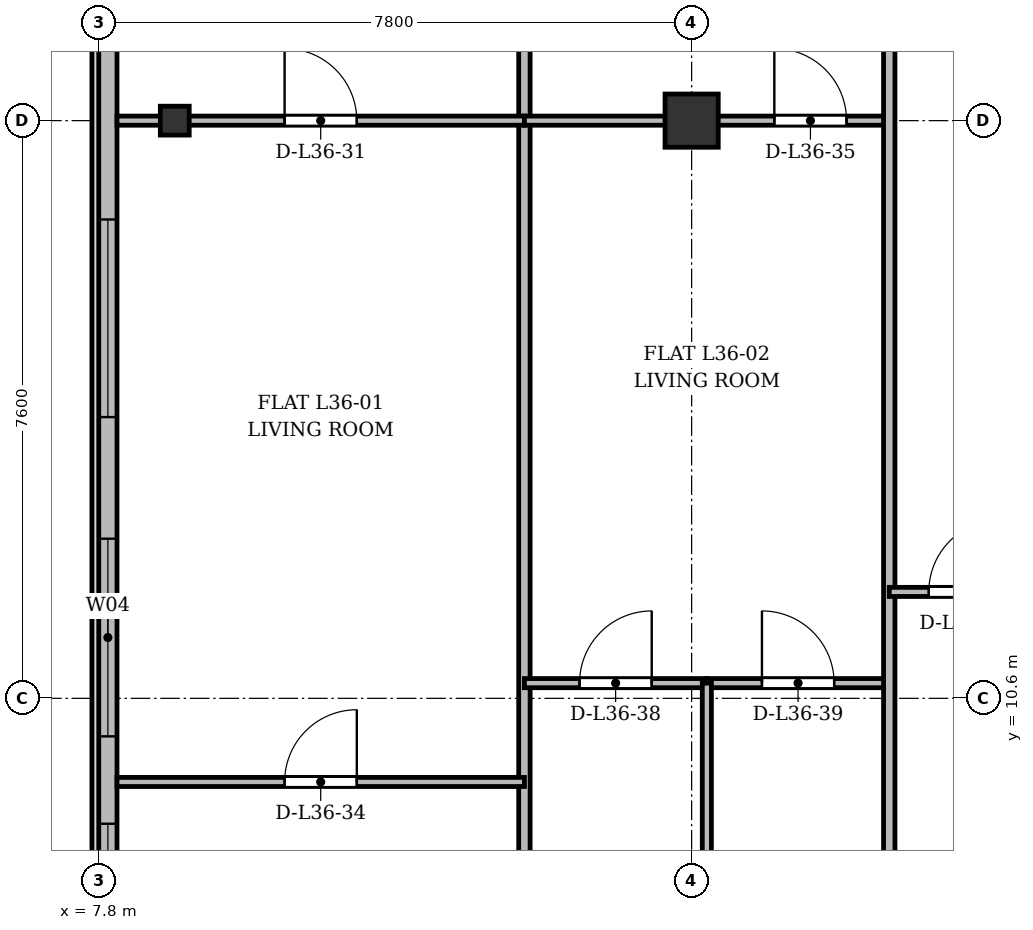
"""IFC4 building model, lengths in metres.
Left out: names, types, materials, properties, quantities, classifications, styles, units other than length and angle.
Written with IfcOpenShell. Run it as: python <this file> out.ifc"""

import sys

from ifc_helpers import new_model, si_unit, direction, frame, frame_2d, origin, origin_2d, place, context, subcontext, project, spatial, rectangle, i_section, extrude, source, transform, mapped, element, fill, save


model = new_model("IFC4")
c1 = context("Model", 3, precision=1e-05, world=origin(), true_north=direction((0.0, 1.0)))
c2 = subcontext(c1, "Body", "Model", "MODEL_VIEW")
j1 = project(units=[si_unit("LENGTHUNIT", "METRE"), si_unit("PLANEANGLEUNIT", "RADIAN")], contexts=[c1])
p1 = place(None, origin())
s1 = spatial("IfcSite", under=j1, at=p1, CompositionType="ELEMENT")
p2 = place(p1, origin())
s2 = spatial("IfcBuilding", under=s1, at=p2, CompositionType="ELEMENT")
p3 = place(p2, frame((0.0, 0.0, 139.3)))
s3 = spatial("IfcBuildingStorey", under=s2, at=p3, CompositionType="ELEMENT", Elevation=139.3)
m1 = source(origin(), c2, "Body", "SweptSolid", [
    extrude(i_section(OverallWidth=0.38, OverallDepth=0.38, WebThickness=0.02, FlangeThickness=0.03, at=origin_2d()), origin(), (0.0, 0.0, 1.0), 3.6),
])
p4 = place(p3, frame((8.8, 18.2, 0.0), z_axis=(0.0, 0.0, 1.0), x_axis=(1.0, 0.0, 0.0)))
e1 = element("IfcColumn", 1, at=p4, inside=s3, PredefinedType="COLUMN", context=c2, shape_type="MappedRepresentation", body=[
    mapped(m1, transform((0.0, 0.0, 0.0), x_axis=(1.0, 0.0, 0.0), y_axis=(0.0, 1.0, 0.0), z_axis=(0.0, 0.0, 1.0), scale=1.0)),
])
m2 = source(origin(), c2, "Body", "SweptSolid", [
    extrude(rectangle(XDim=0.7, YDim=0.7, at=origin_2d()), origin(), (0.0, 0.0, 1.0), 3.6),
])
p5 = place(p3, frame((15.6, 18.2, 0.0), z_axis=(0.0, 0.0, 1.0), x_axis=(1.0, 0.0, 0.0)))
e2 = element("IfcColumn", 2, at=p5, inside=s3, PredefinedType="COLUMN", context=c2, shape_type="MappedRepresentation", body=[
    mapped(m2, transform((0.0, 0.0, 0.0), x_axis=(1.0, 0.0, 0.0), y_axis=(0.0, 1.0, 0.0), z_axis=(0.0, 0.0, 1.0), scale=1.0)),
])
p6 = place(p3, frame((7.92, 6.3, 0.0), z_axis=(0.0, 0.0, 1.0), x_axis=(0.0, 1.0, 0.0)))
e3 = element("IfcWall", 3, at=p6, inside=s3, PredefinedType="SOLIDWALL", context=c2, shape_type="SweptSolid", body=[
    extrude(rectangle(XDim=39.2, YDim=0.24, at=frame_2d((19.6, 0.0))), origin(), (0.0, 0.0, 1.0), 3.35),
])
p7 = place(p6, frame((1.45, 0.0, 0.92)))
e4 = element("IfcOpeningElement", 4, at=p7, cuts=e3, PredefinedType="OPENING", context=c2, shape_type="SweptSolid", body=[
    extrude(rectangle(XDim=1.2, YDim=1.65, at=frame_2d((0.6, 0.825))), frame((0.0, 0.13, 0.0), z_axis=(0.0, -1.0, 0.0), x_axis=(1.0, 0.0, 0.0)), (0.0, 0.0, 1.0), 0.26),
])
p8 = place(p6, frame((3.8, 0.0, 0.92)))
e5 = element("IfcOpeningElement", 5, at=p8, cuts=e3, PredefinedType="OPENING", context=c2, shape_type="SweptSolid", body=[
    extrude(rectangle(XDim=2.6, YDim=1.9, at=frame_2d((1.3, 0.95))), frame((0.0, 0.13, 0.0), z_axis=(0.0, -1.0, 0.0), x_axis=(1.0, 0.0, 0.0)), (0.0, 0.0, 1.0), 0.26),
])
p9 = place(p6, frame((8.0, 0.0, 0.92)))
e6 = element("IfcOpeningElement", 6, at=p9, cuts=e3, PredefinedType="OPENING", context=c2, shape_type="SweptSolid", body=[
    extrude(rectangle(XDim=2.6, YDim=1.9, at=frame_2d((1.3, 0.95))), frame((0.0, 0.13, 0.0), z_axis=(0.0, -1.0, 0.0), x_axis=(1.0, 0.0, 0.0)), (0.0, 0.0, 1.0), 0.26),
])
p10 = place(p6, frame((15.2, 0.0, 0.92)))
e7 = element("IfcOpeningElement", 7, at=p10, cuts=e3, PredefinedType="OPENING", context=c2, shape_type="SweptSolid", body=[
    extrude(rectangle(XDim=2.6, YDim=1.9, at=frame_2d((1.3, 0.95))), frame((0.0, 0.13, 0.0), z_axis=(0.0, -1.0, 0.0), x_axis=(1.0, 0.0, 0.0)), (0.0, 0.0, 1.0), 0.26),
])
p11 = place(p6, frame((33.5, 0.0, 0.92)))
e8 = element("IfcOpeningElement", 8, at=p11, cuts=e3, PredefinedType="OPENING", context=c2, shape_type="SweptSolid", body=[
    extrude(rectangle(XDim=1.2, YDim=1.65, at=frame_2d((0.6, 0.825))), frame((0.0, 0.13, 0.0), z_axis=(0.0, -1.0, 0.0), x_axis=(1.0, 0.0, 0.0)), (0.0, 0.0, 1.0), 0.26),
])
p12 = place(p6, frame((36.85, 0.0, 0.92)))
e9 = element("IfcOpeningElement", 9, at=p12, cuts=e3, PredefinedType="OPENING", context=c2, shape_type="SweptSolid", body=[
    extrude(rectangle(XDim=1.2, YDim=1.65, at=frame_2d((0.6, 0.825))), frame((0.0, 0.13, 0.0), z_axis=(0.0, -1.0, 0.0), x_axis=(1.0, 0.0, 0.0)), (0.0, 0.0, 1.0), 0.26),
])
p13 = place(p3, frame((13.4, 3.525, 0.0), z_axis=(0.0, 0.0, 1.0), x_axis=(0.0, 1.0, 0.0)))
e10 = element("IfcWall", 10, at=p13, inside=s3, PredefinedType="PARTITIONING", context=c2, shape_type="SweptSolid", body=[
    extrude(rectangle(XDim=27.275, YDim=0.15, at=frame_2d((13.638, 0.0))), origin(), (0.0, 0.0, 1.0), 2.75),
])
p14 = place(p3, frame((8.04, 18.2, 0.0), z_axis=(0.0, 0.0, 1.0), x_axis=(1.0, 0.0, 0.0)))
e11 = element("IfcWall", 11, at=p14, inside=s3, PredefinedType="PARTITIONING", context=c2, shape_type="SweptSolid", body=[
    extrude(rectangle(XDim=5.36, YDim=0.12, at=frame_2d((2.68, 0.0))), origin(), (0.0, 0.0, 1.0), 2.75),
])
p15 = place(p14, frame((2.205, 0.0, 0.0)))
e12 = element("IfcOpeningElement", 12, at=p15, cuts=e11, PredefinedType="OPENING", context=c2, shape_type="SweptSolid", body=[
    extrude(rectangle(XDim=0.95, YDim=2.15, at=frame_2d((0.475, 1.075))), frame((0.0, 0.07, 0.0), z_axis=(0.0, -1.0, 0.0), x_axis=(1.0, 0.0, 0.0)), (0.0, 0.0, 1.0), 0.14),
])
p16 = place(p3, frame((8.04, 9.5, 0.0), z_axis=(0.0, 0.0, 1.0), x_axis=(1.0, 0.0, 0.0)))
e13 = element("IfcWall", 13, at=p16, inside=s3, PredefinedType="PARTITIONING", context=c2, shape_type="SweptSolid", body=[
    extrude(rectangle(XDim=5.36, YDim=0.12, at=frame_2d((2.68, 0.0))), origin(), (0.0, 0.0, 1.0), 2.85),
])
p17 = place(p16, frame((2.205, 0.0, 0.0)))
e14 = element("IfcOpeningElement", 14, at=p17, cuts=e13, PredefinedType="OPENING", context=c2, shape_type="SweptSolid", body=[
    extrude(rectangle(XDim=0.95, YDim=2.15, at=frame_2d((0.475, 1.075))), frame((0.0, 0.07, 0.0), z_axis=(0.0, -1.0, 0.0), x_axis=(1.0, 0.0, 0.0)), (0.0, 0.0, 1.0), 0.14),
])
p18 = place(p3, frame((13.4, 18.2, 0.0), z_axis=(0.0, 0.0, 1.0), x_axis=(1.0, 0.0, 0.0)))
e15 = element("IfcWall", 15, at=p18, inside=s3, PredefinedType="PARTITIONING", context=c2, shape_type="SweptSolid", body=[
    extrude(rectangle(XDim=4.8, YDim=0.12, at=frame_2d((2.4, 0.0))), origin(), (0.0, 0.0, 1.0), 2.75),
])
p19 = place(p18, frame((3.288, 0.0, 0.0)))
e16 = element("IfcOpeningElement", 16, at=p19, cuts=e15, PredefinedType="OPENING", context=c2, shape_type="SweptSolid", body=[
    extrude(rectangle(XDim=0.95, YDim=2.15, at=frame_2d((0.475, 1.075))), frame((0.0, 0.07, 0.0), z_axis=(0.0, -1.0, 0.0), x_axis=(1.0, 0.0, 0.0)), (0.0, 0.0, 1.0), 0.14),
])
p20 = place(p3, frame((13.4, 10.8, 0.0), z_axis=(0.0, 0.0, 1.0), x_axis=(1.0, 0.0, 0.0)))
e17 = element("IfcWall", 17, at=p20, inside=s3, PredefinedType="PARTITIONING", context=c2, shape_type="SweptSolid", body=[
    extrude(rectangle(XDim=2.4, YDim=0.12, at=frame_2d((1.2, 0.0))), origin(), (0.0, 0.0, 1.0), 2.85),
])
p21 = place(p20, frame((0.725, 0.0, 0.0)))
e18 = element("IfcOpeningElement", 18, at=p21, cuts=e17, PredefinedType="OPENING", context=c2, shape_type="SweptSolid", body=[
    extrude(rectangle(XDim=0.95, YDim=2.15, at=frame_2d((0.475, 1.075))), frame((0.0, 0.07, 0.0), z_axis=(0.0, -1.0, 0.0), x_axis=(1.0, 0.0, 0.0)), (0.0, 0.0, 1.0), 0.14),
])
p22 = place(p3, frame((15.8, 10.8, 0.0), z_axis=(0.0, 0.0, 1.0), x_axis=(1.0, 0.0, 0.0)))
e19 = element("IfcWall", 19, at=p22, inside=s3, PredefinedType="PARTITIONING", context=c2, shape_type="SweptSolid", body=[
    extrude(rectangle(XDim=2.4, YDim=0.12, at=frame_2d((1.2, 0.0))), origin(), (0.0, 0.0, 1.0), 3.0),
])
p23 = place(p22, frame((0.725, 0.0, 0.0)))
e20 = element("IfcOpeningElement", 20, at=p23, cuts=e19, PredefinedType="OPENING", context=c2, shape_type="SweptSolid", body=[
    extrude(rectangle(XDim=0.95, YDim=2.15, at=frame_2d((0.475, 1.075))), frame((0.0, 0.07, 0.0), z_axis=(0.0, -1.0, 0.0), x_axis=(1.0, 0.0, 0.0)), (0.0, 0.0, 1.0), 0.14),
])
p24 = place(p3, frame((15.8, 3.525, 0.0), z_axis=(0.0, 0.0, 1.0), x_axis=(0.0, 1.0, 0.0)))
e21 = element("IfcWall", 21, at=p24, inside=s3, PredefinedType="PARTITIONING", context=c2, shape_type="SweptSolid", body=[
    extrude(rectangle(XDim=7.275, YDim=0.12, at=frame_2d((3.638, 0.0))), origin(), (0.0, 0.0, 1.0), 2.75),
])
p25 = place(p3, frame((18.2, 3.525, 0.0), z_axis=(0.0, 0.0, 1.0), x_axis=(0.0, 1.0, 0.0)))
e22 = element("IfcWall", 22, at=p25, inside=s3, PredefinedType="PARTITIONING", context=c2, shape_type="SweptSolid", body=[
    extrude(rectangle(XDim=27.275, YDim=0.15, at=frame_2d((13.638, 0.0))), origin(), (0.0, 0.0, 1.0), 2.75),
])
p26 = place(p3, frame((18.2, 12.0, 0.0), z_axis=(0.0, 0.0, 1.0), x_axis=(1.0, 0.0, 0.0)))
e23 = element("IfcWall", 23, at=p26, inside=s3, PredefinedType="PARTITIONING", context=c2, shape_type="SweptSolid", body=[
    extrude(rectangle(XDim=2.0, YDim=0.12, at=frame_2d((1.0, 0.0))), origin(), (0.0, 0.0, 1.0), 3.35),
])
p27 = place(p26, frame((0.52, 0.0, 0.0)))
e24 = element("IfcOpeningElement", 24, at=p27, cuts=e23, PredefinedType="OPENING", context=c2, shape_type="SweptSolid", body=[
    extrude(rectangle(XDim=0.95, YDim=2.15, at=frame_2d((0.475, 1.075))), frame((0.0, 0.07, 0.0), z_axis=(0.0, -1.0, 0.0), x_axis=(1.0, 0.0, 0.0)), (0.0, 0.0, 1.0), 0.14),
])
m3 = source(origin(), c2, "Body", "SweptSolid", [
    extrude(rectangle(XDim=1.2, YDim=1.65, at=frame_2d((0.6, 0.825))), frame((0.0, 0.03, 0.0), z_axis=(0.0, -1.0, 0.0), x_axis=(1.0, 0.0, 0.0)), (0.0, 0.0, 1.0), 0.06),
])
p28 = place(p7, origin())
e25 = element("IfcWindow", 25, at=p28, inside=s3, PartitioningType="SINGLE_PANEL", PredefinedType="WINDOW", context=c2, shape_type="MappedRepresentation", body=[
    mapped(m3, transform((0.0, 0.0, 0.0), x_axis=(1.0, 0.0, 0.0), y_axis=(0.0, 1.0, 0.0), z_axis=(0.0, 0.0, 1.0), scale=1.0)),
])
fill(e4, e25)
m4 = source(origin(), c2, "Body", "SweptSolid", [
    extrude(rectangle(XDim=2.6, YDim=1.9, at=frame_2d((1.3, 0.95))), frame((0.0, 0.03, 0.0), z_axis=(0.0, -1.0, 0.0), x_axis=(1.0, 0.0, 0.0)), (0.0, 0.0, 1.0), 0.06),
])
p29 = place(p8, origin())
e26 = element("IfcWindow", 26, at=p29, inside=s3, PartitioningType="SINGLE_PANEL", PredefinedType="WINDOW", context=c2, shape_type="MappedRepresentation", body=[
    mapped(m4, transform((0.0, 0.0, 0.0), x_axis=(1.0, 0.0, 0.0), y_axis=(0.0, 1.0, 0.0), z_axis=(0.0, 0.0, 1.0), scale=1.0)),
])
fill(e5, e26)
p30 = place(p9, origin())
e27 = element("IfcWindow", 27, at=p30, inside=s3, PartitioningType="SINGLE_PANEL", PredefinedType="WINDOW", context=c2, shape_type="MappedRepresentation", body=[
    mapped(m4, transform((0.0, 0.0, 0.0), x_axis=(1.0, 0.0, 0.0), y_axis=(0.0, 1.0, 0.0), z_axis=(0.0, 0.0, 1.0), scale=1.0)),
])
fill(e6, e27)
m5 = source(origin(), c2, "Body", "SweptSolid", [
    extrude(rectangle(XDim=0.95, YDim=2.15, at=frame_2d((0.475, 1.075))), frame((0.0, 0.025, 0.0), z_axis=(0.0, -1.0, 0.0), x_axis=(1.0, 0.0, 0.0)), (0.0, 0.0, 1.0), 0.05),
])
p31 = place(p15, origin())
e28 = element("IfcDoor", 28, at=p31, inside=s3, OperationType="SINGLE_SWING_LEFT", PredefinedType="DOOR", context=c2, shape_type="MappedRepresentation", body=[
    mapped(m5, transform((0.0, 0.0, 0.0), x_axis=(1.0, 0.0, 0.0), y_axis=(0.0, 1.0, 0.0), z_axis=(0.0, 0.0, 1.0), scale=1.0)),
])
fill(e12, e28)
p32 = place(p17, origin())
e29 = element("IfcDoor", 29, at=p32, inside=s3, OperationType="SINGLE_SWING_RIGHT", PredefinedType="DOOR", context=c2, shape_type="MappedRepresentation", body=[
    mapped(m5, transform((0.0, 0.0, 0.0), x_axis=(1.0, 0.0, 0.0), y_axis=(0.0, 1.0, 0.0), z_axis=(0.0, 0.0, 1.0), scale=1.0)),
])
fill(e14, e29)
p33 = place(p19, origin())
e30 = element("IfcDoor", 30, at=p33, inside=s3, OperationType="SINGLE_SWING_LEFT", PredefinedType="DOOR", context=c2, shape_type="MappedRepresentation", body=[
    mapped(m5, transform((0.0, 0.0, 0.0), x_axis=(1.0, 0.0, 0.0), y_axis=(0.0, 1.0, 0.0), z_axis=(0.0, 0.0, 1.0), scale=1.0)),
])
fill(e16, e30)
p34 = place(p21, origin())
e31 = element("IfcDoor", 31, at=p34, inside=s3, OperationType="SINGLE_SWING_RIGHT", PredefinedType="DOOR", context=c2, shape_type="MappedRepresentation", body=[
    mapped(m5, transform((0.0, 0.0, 0.0), x_axis=(1.0, 0.0, 0.0), y_axis=(0.0, 1.0, 0.0), z_axis=(0.0, 0.0, 1.0), scale=1.0)),
])
fill(e18, e31)
p35 = place(p23, origin())
e32 = element("IfcDoor", 32, at=p35, inside=s3, OperationType="SINGLE_SWING_LEFT", PredefinedType="DOOR", context=c2, shape_type="MappedRepresentation", body=[
    mapped(m5, transform((0.0, 0.0, 0.0), x_axis=(1.0, 0.0, 0.0), y_axis=(0.0, 1.0, 0.0), z_axis=(0.0, 0.0, 1.0), scale=1.0)),
])
fill(e20, e32)
p36 = place(p27, origin())
e33 = element("IfcDoor", 33, at=p36, inside=s3, OperationType="SINGLE_SWING_RIGHT", PredefinedType="DOOR", context=c2, shape_type="MappedRepresentation", body=[
    mapped(m5, transform((0.0, 0.0, 0.0), x_axis=(1.0, 0.0, 0.0), y_axis=(0.0, 1.0, 0.0), z_axis=(0.0, 0.0, 1.0), scale=1.0)),
])
fill(e24, e33)
save(model, sys.argv[1])
